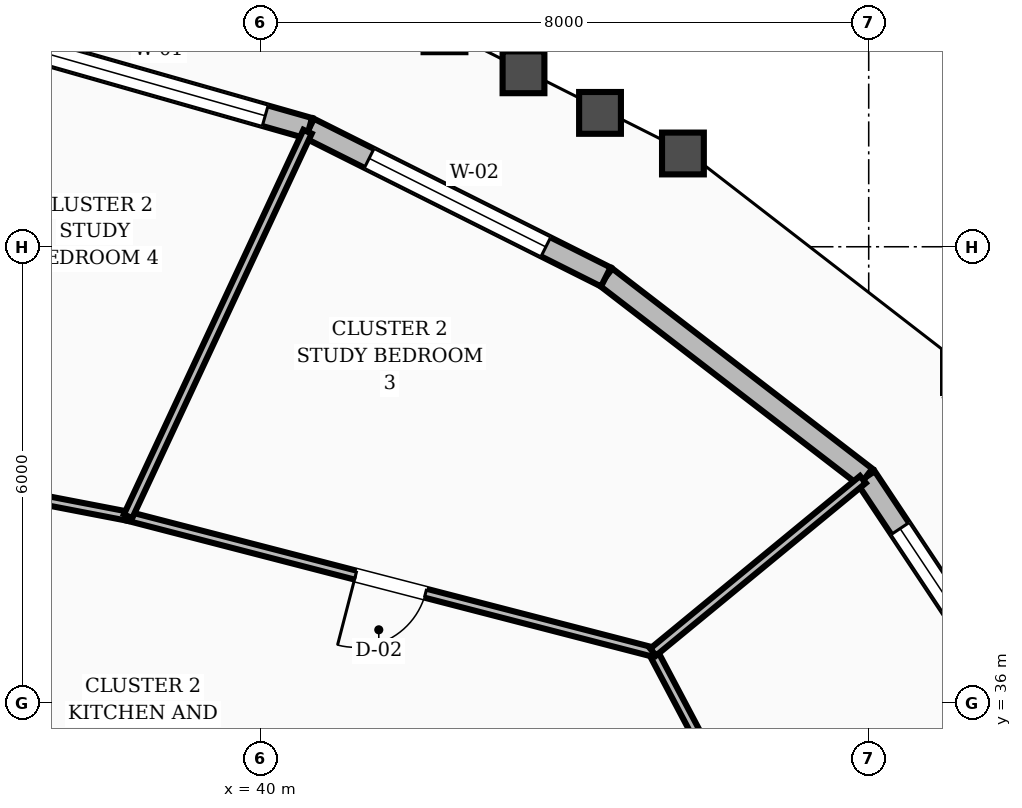
"""IFC4 building model, lengths in metres.
Left out: names, types, materials, properties, quantities, classifications, styles, units other than length and angle.
Written with IfcOpenShell. Run it as: python <this file> out.ifc"""

import sys

from ifc_helpers import new_model, si_unit, direction, frame, frame_2d, origin, place, context, subcontext, project, spatial, rectangle, extrude, element, fill, save


model = new_model("IFC4")
c1 = context("Model", 3, precision=1e-05, world=origin(), true_north=direction((0.0, 1.0)))
c2 = subcontext(c1, "Body", "Model", "MODEL_VIEW")
j1 = project(units=[si_unit("LENGTHUNIT", "METRE"), si_unit("PLANEANGLEUNIT", "RADIAN")], contexts=[c1])
p1 = place(None, origin())
s1 = spatial("IfcSite", under=j1, at=p1, CompositionType="ELEMENT")
p2 = place(p1, origin())
s2 = spatial("IfcBuilding", under=s1, at=p2, CompositionType="ELEMENT")
p3 = place(p2, frame((0.0, 0.0, 229.2)))
s3 = spatial("IfcBuildingStorey", under=s2, at=p3, CompositionType="ELEMENT", Elevation=229.2)
p4 = place(p3, frame((50.355, 35.374, 0.0), z_axis=(0.0, 0.0, 1.0), x_axis=(-0.553982581877, 0.832528257164, 0.0)))
e1 = element("IfcWall", 1, at=p4, inside=s3, PredefinedType="STANDARD", context=c2, shape_type="SweptSolid", body=[
    extrude(rectangle(XDim=4.319, YDim=0.28, at=frame_2d((2.16, 0.0))), origin(), (0.0, 0.0, 1.0), 2.88),
])
p5 = place(p4, frame((0.906, 0.0, 0.8)))
e2 = element("IfcOpeningElement", 2, at=p5, cuts=e1, PredefinedType="OPENING", context=c2, shape_type="SweptSolid", body=[
    extrude(rectangle(XDim=2.6, YDim=1.65, at=frame_2d((1.3, 0.825))), frame((0.0, 0.15, 0.0), z_axis=(0.0, -1.0, 0.0), x_axis=(1.0, 0.0, 0.0)), (0.0, 0.0, 1.0), 0.3),
])
p6 = place(p3, frame((47.962, 38.97, 0.0), z_axis=(0.0, 0.0, 1.0), x_axis=(-0.792451546341, 0.609934870869, 0.0)))
e3 = element("IfcWall", 3, at=p6, inside=s3, PredefinedType="STANDARD", context=c2, shape_type="SweptSolid", body=[
    extrude(rectangle(XDim=4.317, YDim=0.28, at=frame_2d((2.158, 0.0))), origin(), (0.0, 0.0, 1.0), 2.88),
])
p7 = place(p3, frame((44.542, 41.603, 0.0), z_axis=(0.0, 0.0, 1.0), x_axis=(-0.893979362311, 0.448108134005, 0.0)))
e4 = element("IfcWall", 4, at=p7, inside=s3, PredefinedType="STANDARD", context=c2, shape_type="SweptSolid", body=[
    extrude(rectangle(XDim=4.366, YDim=0.28, at=frame_2d((2.183, 0.0))), origin(), (0.0, 0.0, 1.0), 2.88),
])
p8 = place(p7, frame((0.883, 0.0, 0.8)))
e5 = element("IfcOpeningElement", 5, at=p8, cuts=e4, PredefinedType="OPENING", context=c2, shape_type="SweptSolid", body=[
    extrude(rectangle(XDim=2.6, YDim=1.65, at=frame_2d((1.3, 0.825))), frame((0.0, 0.15, 0.0), z_axis=(0.0, -1.0, 0.0), x_axis=(1.0, 0.0, 0.0)), (0.0, 0.0, 1.0), 0.3),
])
p9 = place(p3, frame((40.639, 43.559, 0.0), z_axis=(0.0, 0.0, 1.0), x_axis=(-0.961841376219, 0.27360768811, 0.0)))
e6 = element("IfcWall", 6, at=p9, inside=s3, PredefinedType="STANDARD", context=c2, shape_type="SweptSolid", body=[
    extrude(rectangle(XDim=4.403, YDim=0.28, at=frame_2d((2.201, 0.0))), origin(), (0.0, 0.0, 1.0), 2.88),
])
p10 = place(p9, frame((0.601, 0.0, 0.8)))
e7 = element("IfcOpeningElement", 7, at=p10, cuts=e6, PredefinedType="OPENING", context=c2, shape_type="SweptSolid", body=[
    extrude(rectangle(XDim=3.2, YDim=1.65, at=frame_2d((1.6, 0.825))), frame((0.0, 0.15, 0.0), z_axis=(0.0, -1.0, 0.0), x_axis=(1.0, 0.0, 0.0)), (0.0, 0.0, 1.0), 0.3),
])
p11 = place(p3, frame((48.409, 30.528, 0.0), z_axis=(0.0, 0.0, 1.0), x_axis=(-0.467391727561, 0.884050322667, 0.0)))
e8 = element("IfcWall", 8, at=p11, inside=s3, PredefinedType="PARTITIONING", context=c2, shape_type="SweptSolid", body=[
    extrude(rectangle(XDim=6.944, YDim=0.12, at=frame_2d((3.472, 0.0))), origin(), (0.0, 0.0, 1.0), 2.87),
])
p12 = place(p11, frame((2.997, 0.0, 0.0)))
e9 = element("IfcOpeningElement", 9, at=p12, cuts=e8, PredefinedType="OPENING", context=c2, shape_type="SweptSolid", body=[
    extrude(rectangle(XDim=0.95, YDim=2.1, at=frame_2d((0.475, 1.05))), frame((0.0, 0.07, 0.0), z_axis=(0.0, -1.0, 0.0), x_axis=(1.0, 0.0, 0.0)), (0.0, 0.0, 1.0), 0.14),
])
p13 = place(p3, frame((45.164, 36.667, 0.0), z_axis=(0.0, 0.0, 1.0), x_axis=(-0.968125457117, 0.250465764689, 0.0)))
e10 = element("IfcWall", 10, at=p13, inside=s3, PredefinedType="PARTITIONING", context=c2, shape_type="SweptSolid", body=[
    extrude(rectangle(XDim=7.135, YDim=0.12, at=frame_2d((3.568, 0.0))), origin(), (0.0, 0.0, 1.0), 2.87),
])
p14 = place(p13, frame((3.093, 0.0, 0.0)))
e11 = element("IfcOpeningElement", 11, at=p14, cuts=e10, PredefinedType="OPENING", context=c2, shape_type="SweptSolid", body=[
    extrude(rectangle(XDim=0.95, YDim=2.1, at=frame_2d((0.475, 1.05))), frame((0.0, 0.07, 0.0), z_axis=(0.0, -1.0, 0.0), x_axis=(1.0, 0.0, 0.0)), (0.0, 0.0, 1.0), 0.14),
])
p15 = place(p3, frame((45.164, 36.667, 0.0), z_axis=(0.0, 0.0, 1.0), x_axis=(0.772231834488, 0.635340848525, 0.0)))
e12 = element("IfcWall", 12, at=p15, inside=s3, PredefinedType="PARTITIONING", context=c2, shape_type="SweptSolid", body=[
    extrude(rectangle(XDim=3.574, YDim=0.12, at=frame_2d((1.787, 0.0))), origin(), (0.0, 0.0, 1.0), 2.87),
])
p16 = place(p3, frame((38.256, 38.454, 0.0), z_axis=(0.0, 0.0, 1.0), x_axis=(-0.981903403817, 0.189382432059, 0.0)))
e13 = element("IfcWall", 13, at=p16, inside=s3, PredefinedType="PARTITIONING", context=c2, shape_type="SweptSolid", body=[
    extrude(rectangle(XDim=3.182, YDim=0.12, at=frame_2d((1.591, 0.0))), origin(), (0.0, 0.0, 1.0), 2.87),
])
p17 = place(p16, frame((1.116, 0.0, 0.0)))
e14 = element("IfcOpeningElement", 14, at=p17, cuts=e13, PredefinedType="OPENING", context=c2, shape_type="SweptSolid", body=[
    extrude(rectangle(XDim=0.95, YDim=2.1, at=frame_2d((0.475, 1.05))), frame((0.0, 0.07, 0.0), z_axis=(0.0, -1.0, 0.0), x_axis=(1.0, 0.0, 0.0)), (0.0, 0.0, 1.0), 0.14),
])
p18 = place(p3, frame((38.256, 38.454, 0.0), z_axis=(0.0, 0.0, 1.0), x_axis=(0.422983612083, 0.906137331705, 0.0)))
e15 = element("IfcWall", 15, at=p18, inside=s3, PredefinedType="PARTITIONING", context=c2, shape_type="SweptSolid", body=[
    extrude(rectangle(XDim=5.583, YDim=0.12, at=frame_2d((2.792, 0.0))), origin(), (0.0, 0.0, 1.0), 2.87),
])
p19 = place(p5, origin())
e16 = element("IfcWindow", 16, at=p19, inside=s3, PartitioningType="SINGLE_PANEL", PredefinedType="WINDOW", context=c2, shape_type="SweptSolid", body=[
    extrude(rectangle(XDim=2.6, YDim=1.65, at=frame_2d((1.3, 0.825))), frame((0.0, 0.03, 0.0), z_axis=(0.0, -1.0, 0.0), x_axis=(1.0, 0.0, 0.0)), (0.0, 0.0, 1.0), 0.06),
])
fill(e2, e16)
p20 = place(p8, origin())
e17 = element("IfcWindow", 17, at=p20, inside=s3, PartitioningType="SINGLE_PANEL", PredefinedType="WINDOW", context=c2, shape_type="SweptSolid", body=[
    extrude(rectangle(XDim=2.6, YDim=1.65, at=frame_2d((1.3, 0.825))), frame((0.0, 0.03, 0.0), z_axis=(0.0, -1.0, 0.0), x_axis=(1.0, 0.0, 0.0)), (0.0, 0.0, 1.0), 0.06),
])
fill(e5, e17)
p21 = place(p10, origin())
e18 = element("IfcWindow", 18, at=p21, inside=s3, PartitioningType="SINGLE_PANEL", PredefinedType="WINDOW", context=c2, shape_type="SweptSolid", body=[
    extrude(rectangle(XDim=3.2, YDim=1.65, at=frame_2d((1.6, 0.825))), frame((0.0, 0.03, 0.0), z_axis=(0.0, -1.0, 0.0), x_axis=(1.0, 0.0, 0.0)), (0.0, 0.0, 1.0), 0.06),
])
fill(e7, e18)
p22 = place(p14, origin())
e19 = element("IfcDoor", 19, at=p22, inside=s3, OperationType="SINGLE_SWING_RIGHT", PredefinedType="DOOR", context=c2, shape_type="SweptSolid", body=[
    extrude(rectangle(XDim=0.95, YDim=2.1, at=frame_2d((0.475, 1.05))), frame((0.0, 0.025, 0.0), z_axis=(0.0, -1.0, 0.0), x_axis=(1.0, 0.0, 0.0)), (0.0, 0.0, 1.0), 0.05),
])
fill(e11, e19)
save(model, sys.argv[1])
